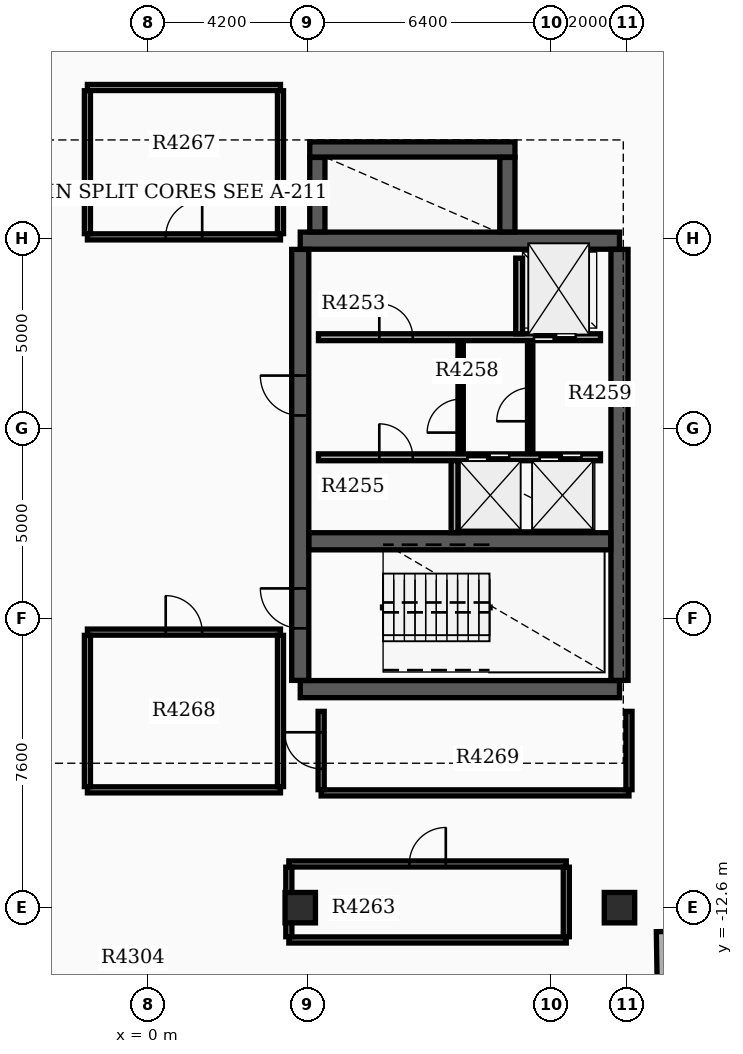
"""IFC4 building model, lengths in metres.
Left out: names, types, materials, properties, quantities, classifications, styles, units other than length and angle.
Written with IfcOpenShell. Run it as: python <this file> out.ifc"""

import sys

from ifc_helpers import new_model, si_unit, direction, frame, frame_2d, origin, origin_2d, place, context, subcontext, project, spatial, rectangle, extrude, element, fill, save


model = new_model("IFC4")
c1 = context("Model", 3, precision=1e-05, world=origin(), true_north=direction((0.0, 1.0)))
c2 = subcontext(c1, "Body", "Model", "MODEL_VIEW")
j1 = project(units=[si_unit("LENGTHUNIT", "METRE"), si_unit("PLANEANGLEUNIT", "RADIAN")], contexts=[c1])
p1 = place(None, origin())
s1 = spatial("IfcSite", under=j1, at=p1, CompositionType="ELEMENT")
p2 = place(p1, origin())
s2 = spatial("IfcBuilding", under=s1, at=p2, CompositionType="ELEMENT")
p3 = place(p2, frame((0.0, 0.0, 269.4)))
s3 = spatial("IfcBuildingStorey", under=s2, at=p3, CompositionType="ELEMENT", Elevation=269.4)
for number, where, z_axis, x_axis in (
    (1, (4.0, -6.85, 0.0), (0.0, 0.0, 1.0), (1.0, 0.0, 0.0)),
    (2, (4.0, 4.95, 0.0), (0.0, 0.0, 1.0), (1.0, 0.0, 0.0)),
):
    element("IfcWall", number, at=place(p3, frame(where, z_axis=z_axis, x_axis=x_axis)), inside=s3, PredefinedType="SHEAR", context=c2, shape_type="SweptSolid", body=[
        extrude(rectangle(XDim=8.4, YDim=0.45, at=frame_2d((4.2, 0.0))), origin(), (0.0, 0.0, 1.0), 3.7),
    ])
p4 = place(p3, frame((4.0, -6.62, 0.0), z_axis=(0.0, 0.0, 1.0), x_axis=(0.0, 1.0, 0.0)))
e3 = element("IfcWall", 3, at=p4, inside=s3, PredefinedType="SHEAR", context=c2, shape_type="SweptSolid", body=[
    extrude(rectangle(XDim=11.34, YDim=0.45, at=frame_2d((5.67, 0.0))), origin(), (0.0, 0.0, 1.0), 3.7),
])
p5 = place(p4, frame((1.37, 0.0, 0.0)))
e4 = element("IfcOpeningElement", 4, at=p5, cuts=e3, PredefinedType="OPENING", context=c2, shape_type="SweptSolid", body=[
    extrude(rectangle(XDim=1.05, YDim=2.15, at=frame_2d((0.525, 1.075))), frame((0.0, 0.235, 0.0), z_axis=(0.0, -1.0, 0.0), x_axis=(1.0, 0.0, 0.0)), (0.0, 0.0, 1.0), 0.47),
])
p6 = place(p4, frame((6.97, 0.0, 0.0)))
e5 = element("IfcOpeningElement", 5, at=p6, cuts=e3, PredefinedType="OPENING", context=c2, shape_type="SweptSolid", body=[
    extrude(rectangle(XDim=1.05, YDim=2.15, at=frame_2d((0.525, 1.075))), frame((0.0, 0.235, 0.0), z_axis=(0.0, -1.0, 0.0), x_axis=(1.0, 0.0, 0.0)), (0.0, 0.0, 1.0), 0.47),
])
p7 = place(p3, frame((12.4, -6.62, 0.0), z_axis=(0.0, 0.0, 1.0), x_axis=(0.0, 1.0, 0.0)))
e6 = element("IfcWall", 6, at=p7, inside=s3, PredefinedType="SHEAR", context=c2, shape_type="SweptSolid", body=[
    extrude(rectangle(XDim=11.34, YDim=0.45, at=frame_2d((5.67, 0.0))), origin(), (0.0, 0.0, 1.0), 3.7),
])
p8 = place(p3, frame((4.23, -2.96, 0.0), z_axis=(0.0, 0.0, 1.0), x_axis=(1.0, 0.0, 0.0)))
e7 = element("IfcWall", 7, at=p8, inside=s3, PredefinedType="SHEAR", context=c2, shape_type="SweptSolid", body=[
    extrude(rectangle(XDim=7.94, YDim=0.45, at=frame_2d((3.97, 0.0))), origin(), (0.0, 0.0, 1.0), 3.7),
])
p9 = place(p3, frame((4.45, 5.18, 0.0), z_axis=(0.0, 0.0, 1.0), x_axis=(0.0, 1.0, 0.0)))
e8 = element("IfcWall", 8, at=p9, inside=s3, PredefinedType="SHEAR", context=c2, shape_type="SweptSolid", body=[
    extrude(rectangle(XDim=1.96, YDim=0.4, at=frame_2d((0.98, 0.0))), origin(), (0.0, 0.0, 1.0), 3.7),
])
p10 = place(p3, frame((4.25, 7.35, 0.0), z_axis=(0.0, 0.0, 1.0), x_axis=(1.0, 0.0, 0.0)))
e9 = element("IfcWall", 9, at=p10, inside=s3, PredefinedType="SHEAR", context=c2, shape_type="SweptSolid", body=[
    extrude(rectangle(XDim=5.4, YDim=0.4, at=frame_2d((2.7, 0.0))), origin(), (0.0, 0.0, 1.0), 3.7),
])
p11 = place(p3, frame((9.45, 5.18, 0.0), z_axis=(0.0, 0.0, 1.0), x_axis=(0.0, 1.0, 0.0)))
e10 = element("IfcWall", 10, at=p11, inside=s3, PredefinedType="SHEAR", context=c2, shape_type="SweptSolid", body=[
    extrude(rectangle(XDim=1.96, YDim=0.4, at=frame_2d((0.98, 0.0))), origin(), (0.0, 0.0, 1.0), 3.7),
])
for number, where, z_axis, x_axis in (
    (11, (12.4, -12.6, 0.0), (0.0, 0.0, 1.0), (1.0, 0.0, 0.0)),
    (12, (4.0, -12.6, 0.0), (0.0, 0.0, 1.0), (1.0, 0.0, 0.0)),
):
    element("IfcColumn", number, at=place(p3, frame(where, z_axis=z_axis, x_axis=x_axis)), inside=s3, PredefinedType="COLUMN", context=c2, shape_type="SweptSolid", body=[
        extrude(rectangle(XDim=0.8, YDim=0.8, at=origin_2d()), origin(), (0.0, 0.0, 1.0), 3.9),
    ])
p12 = place(p3, frame((13.51, -13.229, 0.0), z_axis=(0.0, 0.0, 1.0), x_axis=(0.015625635615, -0.999877912303, 0.0)))
e13 = element("IfcWall", 13, at=p12, inside=s3, PredefinedType="STANDARD", context=c2, shape_type="SweptSolid", body=[
    extrude(rectangle(XDim=1.5, YDim=0.28, at=frame_2d((0.75, 0.0))), origin(), (0.0, 0.0, 1.0), 3.18),
])
p13 = place(p3, frame((4.48, 2.41, 0.0), z_axis=(0.0, 0.0, 1.0), x_axis=(1.0, 0.0, 0.0)))
e14 = element("IfcWall", 14, at=p13, inside=s3, PredefinedType="SOLIDWALL", context=c2, shape_type="SweptSolid", body=[
    extrude(rectangle(XDim=7.42, YDim=0.18, at=frame_2d((3.71, 0.0))), origin(), (0.0, 0.0, 1.0), 3.17),
])
p14 = place(p13, frame((5.67, 0.0, 0.0)))
e15 = element("IfcOpeningElement", 15, at=p14, cuts=e14, PredefinedType="OPENING", context=c2, shape_type="SweptSolid", body=[
    extrude(rectangle(XDim=1.1, YDim=2.15, at=frame_2d((0.55, 1.075))), frame((0.0, 0.1, 0.0), z_axis=(0.0, -1.0, 0.0), x_axis=(1.0, 0.0, 0.0)), (0.0, 0.0, 1.0), 0.2),
])
p15 = place(p13, frame((1.6, 0.0, 0.0)))
e16 = element("IfcOpeningElement", 16, at=p15, cuts=e14, PredefinedType="OPENING", context=c2, shape_type="SweptSolid", body=[
    extrude(rectangle(XDim=0.88, YDim=2.1, at=frame_2d((0.44, 1.05))), frame((0.0, 0.1, 0.0), z_axis=(0.0, -1.0, 0.0), x_axis=(1.0, 0.0, 0.0)), (0.0, 0.0, 1.0), 0.2),
])
p16 = place(p3, frame((4.48, -0.75, 0.0), z_axis=(0.0, 0.0, 1.0), x_axis=(1.0, 0.0, 0.0)))
e17 = element("IfcWall", 17, at=p16, inside=s3, PredefinedType="SOLIDWALL", context=c2, shape_type="SweptSolid", body=[
    extrude(rectangle(XDim=7.42, YDim=0.18, at=frame_2d((3.71, 0.0))), origin(), (0.0, 0.0, 1.0), 3.17),
])
p17 = place(p16, frame((3.92, 0.0, 0.0)))
e18 = element("IfcOpeningElement", 18, at=p17, cuts=e17, PredefinedType="OPENING", context=c2, shape_type="SweptSolid", body=[
    extrude(rectangle(XDim=1.1, YDim=2.15, at=frame_2d((0.55, 1.075))), frame((0.0, 0.1, 0.0), z_axis=(0.0, -1.0, 0.0), x_axis=(1.0, 0.0, 0.0)), (0.0, 0.0, 1.0), 0.2),
])
p18 = place(p16, frame((5.82, 0.0, 0.0)))
e19 = element("IfcOpeningElement", 19, at=p18, cuts=e17, PredefinedType="OPENING", context=c2, shape_type="SweptSolid", body=[
    extrude(rectangle(XDim=1.1, YDim=2.15, at=frame_2d((0.55, 1.075))), frame((0.0, 0.1, 0.0), z_axis=(0.0, -1.0, 0.0), x_axis=(1.0, 0.0, 0.0)), (0.0, 0.0, 1.0), 0.2),
])
p19 = place(p16, frame((1.6, 0.0, 0.0)))
e20 = element("IfcOpeningElement", 20, at=p19, cuts=e17, PredefinedType="OPENING", context=c2, shape_type="SweptSolid", body=[
    extrude(rectangle(XDim=0.88, YDim=2.1, at=frame_2d((0.44, 1.05))), frame((0.0, 0.1, 0.0), z_axis=(0.0, -1.0, 0.0), x_axis=(1.0, 0.0, 0.0)), (0.0, 0.0, 1.0), 0.2),
])
p20 = place(p3, frame((9.76, 2.5, 0.0), z_axis=(0.0, 0.0, 1.0), x_axis=(0.0, 1.0, 0.0)))
e21 = element("IfcWall", 21, at=p20, inside=s3, PredefinedType="SOLIDWALL", context=c2, shape_type="SweptSolid", body=[
    extrude(rectangle(XDim=1.99, YDim=0.18, at=frame_2d((0.995, 0.0))), origin(), (0.0, 0.0, 1.0), 3.17),
])
p21 = place(p3, frame((8.06, -2.73, 0.0), z_axis=(0.0, 0.0, 1.0), x_axis=(0.0, 1.0, 0.0)))
e22 = element("IfcWall", 22, at=p21, inside=s3, PredefinedType="SOLIDWALL", context=c2, shape_type="SweptSolid", body=[
    extrude(rectangle(XDim=1.89, YDim=0.18, at=frame_2d((0.945, 0.0))), origin(), (0.0, 0.0, 1.0), 3.17),
])
p22 = place(p3, frame((8.22, -0.65, 0.0), z_axis=(0.0, 0.0, 1.0), x_axis=(0.0, 1.0, 0.0)))
e23 = element("IfcWall", 23, at=p22, inside=s3, PredefinedType="SOLIDWALL", context=c2, shape_type="SweptSolid", body=[
    extrude(rectangle(XDim=2.96, YDim=0.14, at=frame_2d((1.48, 0.0))), origin(), (0.0, 0.0, 1.0), 3.17),
])
p23 = place(p22, frame((0.55, 0.0, 0.0)))
e24 = element("IfcOpeningElement", 24, at=p23, cuts=e23, PredefinedType="OPENING", context=c2, shape_type="SweptSolid", body=[
    extrude(rectangle(XDim=0.88, YDim=2.1, at=frame_2d((0.44, 1.05))), frame((0.0, 0.08, 0.0), z_axis=(0.0, -1.0, 0.0), x_axis=(1.0, 0.0, 0.0)), (0.0, 0.0, 1.0), 0.16),
])
p24 = place(p3, frame((10.05, -0.652, 0.0), z_axis=(0.0, 0.0, 1.0), x_axis=(0.0, 1.0, 0.0)))
e25 = element("IfcWall", 25, at=p24, inside=s3, PredefinedType="PARTITIONING", context=c2, shape_type="SweptSolid", body=[
    extrude(rectangle(XDim=2.962, YDim=0.14, at=frame_2d((1.481, 0.0))), origin(), (0.0, 0.0, 1.0), 3.17),
])
p25 = place(p24, frame((0.85, 0.0, 0.0)))
e26 = element("IfcOpeningElement", 26, at=p25, cuts=e25, PredefinedType="OPENING", context=c2, shape_type="SweptSolid", body=[
    extrude(rectangle(XDim=0.88, YDim=2.1, at=frame_2d((0.44, 1.05))), frame((0.0, 0.08, 0.0), z_axis=(0.0, -1.0, 0.0), x_axis=(1.0, 0.0, 0.0)), (0.0, 0.0, 1.0), 0.16),
])
p26 = place(p3, frame((3.7, -13.45, 0.0), z_axis=(0.0, 0.0, 1.0), x_axis=(1.0, 0.0, 0.0)))
e27 = element("IfcWall", 27, at=p26, inside=s3, PredefinedType="PARTITIONING", context=c2, shape_type="SweptSolid", body=[
    extrude(rectangle(XDim=7.3, YDim=0.16, at=frame_2d((3.65, 0.0))), origin(), (0.0, 0.0, 1.0), 3.17),
])
p27 = place(p3, frame((3.7, -11.45, 0.0), z_axis=(0.0, 0.0, 1.0), x_axis=(1.0, 0.0, 0.0)))
e28 = element("IfcWall", 28, at=p27, inside=s3, PredefinedType="PARTITIONING", context=c2, shape_type="SweptSolid", body=[
    extrude(rectangle(XDim=7.3, YDim=0.16, at=frame_2d((3.65, 0.0))), origin(), (0.0, 0.0, 1.0), 3.17),
])
p28 = place(p27, frame((3.17, 0.0, 0.0)))
e29 = element("IfcOpeningElement", 29, at=p28, cuts=e28, PredefinedType="OPENING", context=c2, shape_type="SweptSolid", body=[
    extrude(rectangle(XDim=0.96, YDim=2.15, at=frame_2d((0.48, 1.075))), frame((0.0, 0.09, 0.0), z_axis=(0.0, -1.0, 0.0), x_axis=(1.0, 0.0, 0.0)), (0.0, 0.0, 1.0), 0.18),
])
for number, where, z_axis, x_axis in (
    (30, (3.7, -13.365, 0.0), (0.0, 0.0, 1.0), (0.0, 1.0, 0.0)),
    (31, (11.0, -13.365, 0.0), (0.0, 0.0, 1.0), (0.0, 1.0, 0.0)),
):
    element("IfcWall", number, at=place(p3, frame(where, z_axis=z_axis, x_axis=x_axis)), inside=s3, PredefinedType="PARTITIONING", context=c2, shape_type="SweptSolid", body=[
        extrude(rectangle(XDim=1.83, YDim=0.16, at=frame_2d((0.915, 0.0))), origin(), (0.0, 0.0, 1.0), 3.17),
    ])
p29 = place(p3, frame((-1.6, 5.05, 0.0), z_axis=(0.0, 0.0, 1.0), x_axis=(1.0, 0.0, 0.0)))
e32 = element("IfcWall", 32, at=p29, inside=s3, PredefinedType="PARTITIONING", context=c2, shape_type="SweptSolid", body=[
    extrude(rectangle(XDim=5.08, YDim=0.16, at=frame_2d((2.54, 0.0))), origin(), (0.0, 0.0, 1.0), 3.17),
])
p30 = place(p29, frame((2.06, 0.0, 0.0)))
e33 = element("IfcOpeningElement", 33, at=p30, cuts=e32, PredefinedType="OPENING", context=c2, shape_type="SweptSolid", body=[
    extrude(rectangle(XDim=0.96, YDim=2.15, at=frame_2d((0.48, 1.075))), frame((0.0, 0.09, 0.0), z_axis=(0.0, -1.0, 0.0), x_axis=(1.0, 0.0, 0.0)), (0.0, 0.0, 1.0), 0.18),
])
p31 = place(p3, frame((-1.6, 8.98, 0.0), z_axis=(0.0, 0.0, 1.0), x_axis=(1.0, 0.0, 0.0)))
e34 = element("IfcWall", 34, at=p31, inside=s3, PredefinedType="PARTITIONING", context=c2, shape_type="SweptSolid", body=[
    extrude(rectangle(XDim=5.08, YDim=0.16, at=frame_2d((2.54, 0.0))), origin(), (0.0, 0.0, 1.0), 3.17),
])
for number, where, z_axis, x_axis in (
    (35, (-1.6, 5.135, 0.0), (0.0, 0.0, 1.0), (0.0, 1.0, 0.0)),
    (36, (3.48, 5.135, 0.0), (0.0, 0.0, 1.0), (0.0, 1.0, 0.0)),
):
    element("IfcWall", number, at=place(p3, frame(where, z_axis=z_axis, x_axis=x_axis)), inside=s3, PredefinedType="PARTITIONING", context=c2, shape_type="SweptSolid", body=[
        extrude(rectangle(XDim=3.76, YDim=0.16, at=frame_2d((1.88, 0.0))), origin(), (0.0, 0.0, 1.0), 3.17),
    ])
p32 = place(p3, frame((-1.6, -9.5, 0.0), z_axis=(0.0, 0.0, 1.0), x_axis=(1.0, 0.0, 0.0)))
e37 = element("IfcWall", 37, at=p32, inside=s3, PredefinedType="PARTITIONING", context=c2, shape_type="SweptSolid", body=[
    extrude(rectangle(XDim=5.08, YDim=0.16, at=frame_2d((2.54, 0.0))), origin(), (0.0, 0.0, 1.0), 3.17),
])
p33 = place(p3, frame((-1.6, -5.35, 0.0), z_axis=(0.0, 0.0, 1.0), x_axis=(1.0, 0.0, 0.0)))
e38 = element("IfcWall", 38, at=p33, inside=s3, PredefinedType="PARTITIONING", context=c2, shape_type="SweptSolid", body=[
    extrude(rectangle(XDim=5.08, YDim=0.16, at=frame_2d((2.54, 0.0))), origin(), (0.0, 0.0, 1.0), 3.17),
])
p34 = place(p33, frame((2.06, 0.0, 0.0)))
e39 = element("IfcOpeningElement", 39, at=p34, cuts=e38, PredefinedType="OPENING", context=c2, shape_type="SweptSolid", body=[
    extrude(rectangle(XDim=0.96, YDim=2.15, at=frame_2d((0.48, 1.075))), frame((0.0, 0.09, 0.0), z_axis=(0.0, -1.0, 0.0), x_axis=(1.0, 0.0, 0.0)), (0.0, 0.0, 1.0), 0.18),
])
for number, where, z_axis, x_axis in (
    (40, (-1.6, -9.415, 0.0), (0.0, 0.0, 1.0), (0.0, 1.0, 0.0)),
    (41, (3.48, -9.415, 0.0), (0.0, 0.0, 1.0), (0.0, 1.0, 0.0)),
):
    element("IfcWall", number, at=place(p3, frame(where, z_axis=z_axis, x_axis=x_axis)), inside=s3, PredefinedType="PARTITIONING", context=c2, shape_type="SweptSolid", body=[
        extrude(rectangle(XDim=3.98, YDim=0.16, at=frame_2d((1.99, 0.0))), origin(), (0.0, 0.0, 1.0), 3.17),
    ])
p35 = place(p3, frame((4.55, -9.58, 0.0), z_axis=(0.0, 0.0, 1.0), x_axis=(1.0, 0.0, 0.0)))
e42 = element("IfcWall", 42, at=p35, inside=s3, PredefinedType="PARTITIONING", context=c2, shape_type="SweptSolid", body=[
    extrude(rectangle(XDim=8.1, YDim=0.16, at=frame_2d((4.05, 0.0))), origin(), (0.0, 0.0, 1.0), 3.17),
])
p36 = place(p3, frame((4.55, -9.495, 0.0), z_axis=(0.0, 0.0, 1.0), x_axis=(0.0, 1.0, 0.0)))
e43 = element("IfcWall", 43, at=p36, inside=s3, PredefinedType="PARTITIONING", context=c2, shape_type="SweptSolid", body=[
    extrude(rectangle(XDim=2.06, YDim=0.16, at=frame_2d((1.03, 0.0))), origin(), (0.0, 0.0, 1.0), 3.17),
])
p37 = place(p36, frame((0.55, 0.0, 0.0)))
e44 = element("IfcOpeningElement", 44, at=p37, cuts=e43, PredefinedType="OPENING", context=c2, shape_type="SweptSolid", body=[
    extrude(rectangle(XDim=0.96, YDim=2.15, at=frame_2d((0.48, 1.075))), frame((0.0, 0.09, 0.0), z_axis=(0.0, -1.0, 0.0), x_axis=(1.0, 0.0, 0.0)), (0.0, 0.0, 1.0), 0.18),
])
p38 = place(p3, frame((12.65, -9.495, 0.0), z_axis=(0.0, 0.0, 1.0), x_axis=(0.0, 1.0, 0.0)))
e45 = element("IfcWall", 45, at=p38, inside=s3, PredefinedType="PARTITIONING", context=c2, shape_type="SweptSolid", body=[
    extrude(rectangle(XDim=2.06, YDim=0.16, at=frame_2d((1.03, 0.0))), origin(), (0.0, 0.0, 1.0), 3.17),
])
p39 = place(p5, origin())
e46 = element("IfcDoor", 46, at=p39, inside=s3, OperationType="SINGLE_SWING_RIGHT", PredefinedType="DOOR", context=c2, shape_type="SweptSolid", body=[
    extrude(rectangle(XDim=1.05, YDim=2.15, at=frame_2d((0.525, 1.075))), frame((0.0, 0.025, 0.0), z_axis=(0.0, -1.0, 0.0), x_axis=(1.0, 0.0, 0.0)), (0.0, 0.0, 1.0), 0.05),
])
fill(e4, e46)
p40 = place(p6, origin())
e47 = element("IfcDoor", 47, at=p40, inside=s3, OperationType="SINGLE_SWING_RIGHT", PredefinedType="DOOR", context=c2, shape_type="SweptSolid", body=[
    extrude(rectangle(XDim=1.05, YDim=2.15, at=frame_2d((0.525, 1.075))), frame((0.0, 0.025, 0.0), z_axis=(0.0, -1.0, 0.0), x_axis=(1.0, 0.0, 0.0)), (0.0, 0.0, 1.0), 0.05),
])
fill(e5, e47)
p41 = place(p14, origin())
e48 = element("IfcDoor", 48, at=p41, inside=s3, OperationType="DOUBLE_DOOR_SLIDING", PredefinedType="DOOR", context=c2, shape_type="SweptSolid", body=[
    extrude(rectangle(XDim=1.1, YDim=2.15, at=frame_2d((0.55, 1.075))), frame((0.0, 0.025, 0.0), z_axis=(0.0, -1.0, 0.0), x_axis=(1.0, 0.0, 0.0)), (0.0, 0.0, 1.0), 0.05),
])
fill(e15, e48)
p42 = place(p17, origin())
e49 = element("IfcDoor", 49, at=p42, inside=s3, OperationType="DOUBLE_DOOR_SLIDING", PredefinedType="DOOR", context=c2, shape_type="SweptSolid", body=[
    extrude(rectangle(XDim=1.1, YDim=2.15, at=frame_2d((0.55, 1.075))), frame((0.0, 0.025, 0.0), z_axis=(0.0, -1.0, 0.0), x_axis=(1.0, 0.0, 0.0)), (0.0, 0.0, 1.0), 0.05),
])
fill(e18, e49)
p43 = place(p18, origin())
e50 = element("IfcDoor", 50, at=p43, inside=s3, OperationType="DOUBLE_DOOR_SLIDING", PredefinedType="DOOR", context=c2, shape_type="SweptSolid", body=[
    extrude(rectangle(XDim=1.1, YDim=2.15, at=frame_2d((0.55, 1.075))), frame((0.0, 0.025, 0.0), z_axis=(0.0, -1.0, 0.0), x_axis=(1.0, 0.0, 0.0)), (0.0, 0.0, 1.0), 0.05),
])
fill(e19, e50)
p44 = place(p15, origin())
e51 = element("IfcDoor", 51, at=p44, inside=s3, OperationType="SINGLE_SWING_LEFT", PredefinedType="DOOR", context=c2, shape_type="SweptSolid", body=[
    extrude(rectangle(XDim=0.88, YDim=2.1, at=frame_2d((0.44, 1.05))), frame((0.0, 0.025, 0.0), z_axis=(0.0, -1.0, 0.0), x_axis=(1.0, 0.0, 0.0)), (0.0, 0.0, 1.0), 0.05),
])
fill(e16, e51)
p45 = place(p19, origin())
e52 = element("IfcDoor", 52, at=p45, inside=s3, OperationType="SINGLE_SWING_LEFT", PredefinedType="DOOR", context=c2, shape_type="SweptSolid", body=[
    extrude(rectangle(XDim=0.88, YDim=2.1, at=frame_2d((0.44, 1.05))), frame((0.0, 0.025, 0.0), z_axis=(0.0, -1.0, 0.0), x_axis=(1.0, 0.0, 0.0)), (0.0, 0.0, 1.0), 0.05),
])
fill(e20, e52)
p46 = place(p23, origin())
e53 = element("IfcDoor", 53, at=p46, inside=s3, OperationType="SINGLE_SWING_LEFT", PredefinedType="DOOR", context=c2, shape_type="SweptSolid", body=[
    extrude(rectangle(XDim=0.88, YDim=2.1, at=frame_2d((0.44, 1.05))), frame((0.0, 0.025, 0.0), z_axis=(0.0, -1.0, 0.0), x_axis=(1.0, 0.0, 0.0)), (0.0, 0.0, 1.0), 0.05),
])
fill(e24, e53)
p47 = place(p25, origin())
e54 = element("IfcDoor", 54, at=p47, inside=s3, OperationType="SINGLE_SWING_LEFT", PredefinedType="DOOR", context=c2, shape_type="SweptSolid", body=[
    extrude(rectangle(XDim=0.88, YDim=2.1, at=frame_2d((0.44, 1.05))), frame((0.0, 0.025, 0.0), z_axis=(0.0, -1.0, 0.0), x_axis=(1.0, 0.0, 0.0)), (0.0, 0.0, 1.0), 0.05),
])
fill(e26, e54)
p48 = place(p28, origin())
e55 = element("IfcDoor", 55, at=p48, inside=s3, OperationType="SINGLE_SWING_RIGHT", PredefinedType="DOOR", context=c2, shape_type="SweptSolid", body=[
    extrude(rectangle(XDim=0.96, YDim=2.15, at=frame_2d((0.48, 1.075))), frame((0.0, 0.025, 0.0), z_axis=(0.0, -1.0, 0.0), x_axis=(1.0, 0.0, 0.0)), (0.0, 0.0, 1.0), 0.05),
])
fill(e29, e55)
p49 = place(p30, origin())
e56 = element("IfcDoor", 56, at=p49, inside=s3, OperationType="SINGLE_SWING_RIGHT", PredefinedType="DOOR", context=c2, shape_type="SweptSolid", body=[
    extrude(rectangle(XDim=0.96, YDim=2.15, at=frame_2d((0.48, 1.075))), frame((0.0, 0.025, 0.0), z_axis=(0.0, -1.0, 0.0), x_axis=(1.0, 0.0, 0.0)), (0.0, 0.0, 1.0), 0.05),
])
fill(e33, e56)
p50 = place(p34, origin())
e57 = element("IfcDoor", 57, at=p50, inside=s3, OperationType="SINGLE_SWING_LEFT", PredefinedType="DOOR", context=c2, shape_type="SweptSolid", body=[
    extrude(rectangle(XDim=0.96, YDim=2.15, at=frame_2d((0.48, 1.075))), frame((0.0, 0.025, 0.0), z_axis=(0.0, -1.0, 0.0), x_axis=(1.0, 0.0, 0.0)), (0.0, 0.0, 1.0), 0.05),
])
fill(e39, e57)
p51 = place(p37, origin())
e58 = element("IfcDoor", 58, at=p51, inside=s3, OperationType="SINGLE_SWING_RIGHT", PredefinedType="DOOR", context=c2, shape_type="SweptSolid", body=[
    extrude(rectangle(XDim=0.96, YDim=2.15, at=frame_2d((0.48, 1.075))), frame((0.0, 0.025, 0.0), z_axis=(0.0, -1.0, 0.0), x_axis=(1.0, 0.0, 0.0)), (0.0, 0.0, 1.0), 0.05),
])
fill(e44, e58)
save(model, sys.argv[1])
